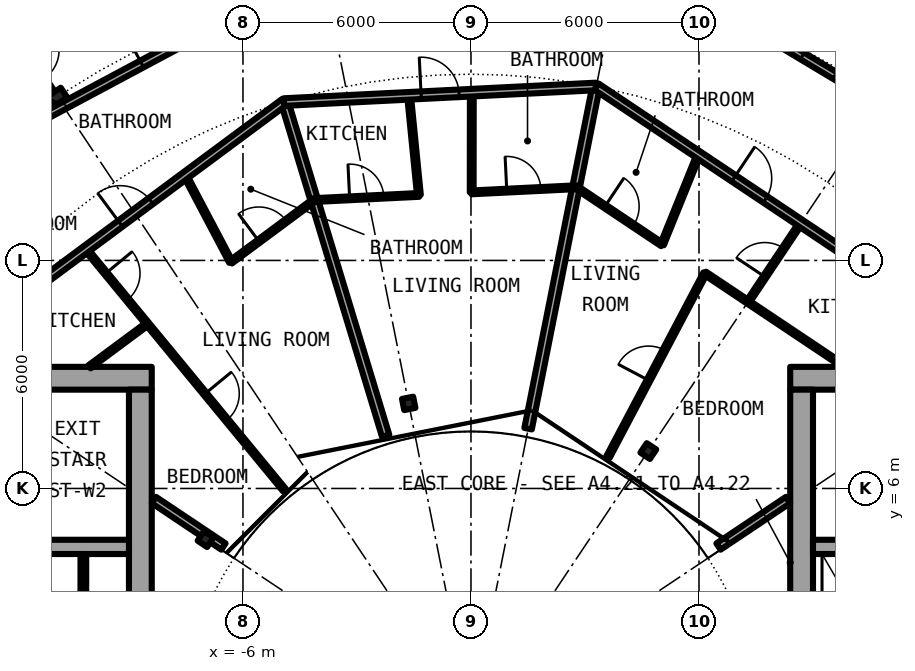
"""IFC4 building model, lengths in metres.
Left out: names, types, materials, properties, quantities, classifications, styles, units other than length and angle.
Written with IfcOpenShell. Run it as: python <this file> out.ifc"""

import sys

from ifc_helpers import new_model, si_unit, direction, frame, frame_2d, origin, origin_2d, place, context, subcontext, project, spatial, rectangle, i_section, extrude, element, fill, save


model = new_model("IFC4")
c1 = context("Model", 3, precision=1e-05, world=origin(), true_north=direction((0.0, 1.0)))
c2 = subcontext(c1, "Body", "Model", "MODEL_VIEW")
j1 = project(units=[si_unit("LENGTHUNIT", "METRE"), si_unit("PLANEANGLEUNIT", "RADIAN")], contexts=[c1])
p1 = place(None, origin())
s1 = spatial("IfcSite", under=j1, at=p1, CompositionType="ELEMENT")
p2 = place(p1, origin())
s2 = spatial("IfcBuilding", under=s1, at=p2, CompositionType="ELEMENT")
p3 = place(p2, frame((0.0, 0.0, 123.85)))
s3 = spatial("IfcBuildingStorey", under=s2, at=p3, CompositionType="ELEMENT", Elevation=123.85)
p4 = place(p3, frame((-10.889, 16.297, 0.0), z_axis=(0.0, 0.0, 1.0), x_axis=(-0.55557023302, 0.831469612303, 0.0)))
e1 = element("IfcColumn", 1, at=p4, inside=s3, PredefinedType="COLUMN", context=c2, shape_type="SweptSolid", body=[
    extrude(i_section(OverallWidth=0.307, OverallDepth=0.432, WebThickness=0.021, FlangeThickness=0.04, FilletRadius=0.027, at=origin_2d()), origin(), (0.0, 0.0, 1.0), 3.05),
])
for number, where, z_axis, x_axis in (
    (2, (4.667, 6.984, 0.0), (0.0, 0.0, 1.0), (0.556, 0.831, 0.0)),
    (3, (-1.639, 8.239, 0.0), (0.0, 0.0, 1.0), (-0.195, 0.981, 0.0)),
    (4, (-6.984, 4.667, 0.0), (0.0, 0.0, 1.0), (-0.831, 0.556, 0.0)),
):
    element("IfcColumn", number, at=place(p3, frame(where, z_axis=z_axis, x_axis=x_axis)), inside=s3, PredefinedType="COLUMN", context=c2, shape_type="SweptSolid", body=[
        extrude(i_section(OverallWidth=0.3, OverallDepth=0.3, WebThickness=0.011, FlangeThickness=0.019, FilletRadius=0.027, at=origin_2d()), origin(), (0.0, 0.0, 1.0), 3.05),
    ])
p5 = place(p3, frame((22.2, 8.9, 0.0), z_axis=(0.0, 0.0, 1.0), x_axis=(-1.0, 0.0, 0.0)))
e5 = element("IfcWall", 5, at=p5, inside=s3, PredefinedType="SHEAR", context=c2, shape_type="SweptSolid", body=[
    extrude(rectangle(XDim=13.8, YDim=0.6, at=frame_2d((6.9, 0.0))), origin(), (0.0, 0.0, 1.0), 3.05),
])
p6 = place(p5, frame((1.125, 0.0, 0.0)))
e6 = element("IfcOpeningElement", 6, at=p6, cuts=e5, PredefinedType="OPENING", context=c2, shape_type="SweptSolid", body=[
    extrude(rectangle(XDim=1.2, YDim=2.3, at=frame_2d((0.6, 1.15))), frame((0.0, 0.31, 0.0), z_axis=(0.0, -1.0, 0.0), x_axis=(1.0, 0.0, 0.0)), (0.0, 0.0, 1.0), 0.62),
])
p7 = place(p3, frame((8.7, -8.6, 0.0), z_axis=(0.0, 0.0, 1.0), x_axis=(0.0, 1.0, 0.0)))
e7 = element("IfcWall", 7, at=p7, inside=s3, PredefinedType="SHEAR", context=c2, shape_type="SweptSolid", body=[
    extrude(rectangle(XDim=17.2, YDim=0.6, at=frame_2d((8.6, 0.0))), origin(), (0.0, 0.0, 1.0), 3.05),
])
p8 = place(p7, frame((7.4, 0.0, 0.1)))
e8 = element("IfcOpeningElement", 8, at=p8, cuts=e7, PredefinedType="OPENING", context=c2, shape_type="SweptSolid", body=[
    extrude(rectangle(XDim=2.4, YDim=2.2, at=frame_2d((1.2, 1.1))), frame((0.0, 0.31, 0.0), z_axis=(0.0, -1.0, 0.0), x_axis=(1.0, 0.0, 0.0)), (0.0, 0.0, 1.0), 0.62),
])
p9 = place(p3, frame((9.0, 4.462, 0.0), z_axis=(0.0, 0.0, 1.0), x_axis=(1.0, 0.0, 0.0)))
e9 = element("IfcWall", 9, at=p9, inside=s3, PredefinedType="SHEAR", context=c2, shape_type="SweptSolid", body=[
    extrude(rectangle(XDim=10.15, YDim=0.375, at=frame_2d((5.075, 0.0))), origin(), (0.0, 0.0, 1.0), 3.05),
])
p10 = place(p9, frame((6.6, 0.0, 0.0)))
e10 = element("IfcOpeningElement", 10, at=p10, cuts=e9, PredefinedType="OPENING", context=c2, shape_type="SweptSolid", body=[
    extrude(rectangle(XDim=1.1, YDim=2.3, at=frame_2d((0.55, 1.15))), frame((0.0, 0.198, 0.0), z_axis=(0.0, -1.0, 0.0), x_axis=(1.0, 0.0, 0.0)), (0.0, 0.0, 1.0), 0.395),
])
p11 = place(p3, frame((-8.4, 8.9, 0.0), z_axis=(0.0, 0.0, 1.0), x_axis=(-1.0, 0.0, 0.0)))
e11 = element("IfcWall", 11, at=p11, inside=s3, PredefinedType="SHEAR", context=c2, shape_type="SweptSolid", body=[
    extrude(rectangle(XDim=13.8, YDim=0.6, at=frame_2d((6.9, 0.0))), origin(), (0.0, 0.0, 1.0), 3.05),
])
p12 = place(p11, frame((11.475, 0.0, 0.0)))
e12 = element("IfcOpeningElement", 12, at=p12, cuts=e11, PredefinedType="OPENING", context=c2, shape_type="SweptSolid", body=[
    extrude(rectangle(XDim=1.2, YDim=2.3, at=frame_2d((0.6, 1.15))), frame((0.0, 0.31, 0.0), z_axis=(0.0, -1.0, 0.0), x_axis=(1.0, 0.0, 0.0)), (0.0, 0.0, 1.0), 0.62),
])
p13 = place(p3, frame((-8.7, 8.6, 0.0), z_axis=(0.0, 0.0, 1.0), x_axis=(0.0, -1.0, 0.0)))
e13 = element("IfcWall", 13, at=p13, inside=s3, PredefinedType="SHEAR", context=c2, shape_type="SweptSolid", body=[
    extrude(rectangle(XDim=17.2, YDim=0.6, at=frame_2d((8.6, 0.0))), origin(), (0.0, 0.0, 1.0), 3.05),
])
p14 = place(p13, frame((7.4, 0.0, 0.1)))
e14 = element("IfcOpeningElement", 14, at=p14, cuts=e13, PredefinedType="OPENING", context=c2, shape_type="SweptSolid", body=[
    extrude(rectangle(XDim=2.4, YDim=2.2, at=frame_2d((1.2, 1.1))), frame((0.0, 0.31, 0.0), z_axis=(0.0, -1.0, 0.0), x_axis=(1.0, 0.0, 0.0)), (0.0, 0.0, 1.0), 0.62),
])
p15 = place(p3, frame((-9.0, 4.462, 0.0), z_axis=(0.0, 0.0, 1.0), x_axis=(-1.0, 0.0, 0.0)))
e15 = element("IfcWall", 15, at=p15, inside=s3, PredefinedType="SHEAR", context=c2, shape_type="SweptSolid", body=[
    extrude(rectangle(XDim=10.15, YDim=0.375, at=frame_2d((5.075, 0.0))), origin(), (0.0, 0.0, 1.0), 3.05),
])
p16 = place(p3, frame((-10.2, 1.825, 0.0), z_axis=(0.0, 0.0, 1.0), x_axis=(0.0, 1.0, 0.0)))
e16 = element("IfcWall", 16, at=p16, inside=s3, PredefinedType="PARTITIONING", context=c2, shape_type="SweptSolid", body=[
    extrude(rectangle(XDim=2.45, YDim=0.15, at=frame_2d((1.225, 0.0))), origin(), (0.0, 0.0, 1.0), 2.7),
])
p17 = place(p3, frame((-4.907, 16.172, 0.0), z_axis=(0.0, 0.0, 1.0), x_axis=(0.289977130626, -0.957033575019, 0.0)))
e17 = element("IfcWall", 17, at=p17, inside=s3, PredefinedType="PARTITIONING", context=c2, shape_type="SweptSolid", body=[
    extrude(rectangle(XDim=9.18, YDim=0.2, at=frame_2d((4.59, 0.0))), origin(), (0.0, 0.0, 1.0), 2.7),
])
p18 = place(p3, frame((-12.229, 18.264, 0.0), z_axis=(0.0, 0.0, 1.0), x_axis=(0.556469477731, -0.830868052313, 0.0)))
e18 = element("IfcWall", 18, at=p18, inside=s3, PredefinedType="PARTITIONING", context=c2, shape_type="SweptSolid", body=[
    extrude(rectangle(XDim=2.164, YDim=0.1, at=frame_2d((1.082, 0.0))), origin(), (0.0, 0.0, 1.0), 2.7),
])
p19 = place(p18, frame((0.881, 0.0, 0.0)))
e19 = element("IfcOpeningElement", 19, at=p19, cuts=e18, PredefinedType="OPENING", context=c2, shape_type="SweptSolid", body=[
    extrude(rectangle(XDim=0.9, YDim=2.3, at=frame_2d((0.45, 1.15))), frame((0.0, 0.06, 0.0), z_axis=(0.0, -1.0, 0.0), x_axis=(1.0, 0.0, 0.0)), (0.0, 0.0, 1.0), 0.12),
])
p20 = place(p3, frame((-10.132, 12.296, 0.0), z_axis=(0.0, 0.0, 1.0), x_axis=(0.635976043025, -0.771708800454, 0.0)))
e20 = element("IfcWall", 20, at=p20, inside=s3, PredefinedType="PARTITIONING", context=c2, shape_type="SweptSolid", body=[
    extrude(rectangle(XDim=8.213, YDim=0.1, at=frame_2d((4.106, 0.0))), origin(), (0.0, 0.0, 1.0), 2.7),
])
p21 = place(p20, frame((0.823, 0.0, 0.0)))
e21 = element("IfcOpeningElement", 21, at=p21, cuts=e20, PredefinedType="OPENING", context=c2, shape_type="SweptSolid", body=[
    extrude(rectangle(XDim=0.9, YDim=2.3, at=frame_2d((0.45, 1.15))), frame((0.0, 0.06, 0.0), z_axis=(0.0, -1.0, 0.0), x_axis=(1.0, 0.0, 0.0)), (0.0, 0.0, 1.0), 0.12),
])
p22 = place(p20, frame((4.929, 0.0, 0.0)))
e22 = element("IfcOpeningElement", 22, at=p22, cuts=e20, PredefinedType="OPENING", context=c2, shape_type="SweptSolid", body=[
    extrude(rectangle(XDim=0.9, YDim=2.3, at=frame_2d((0.45, 1.15))), frame((0.0, 0.06, 0.0), z_axis=(0.0, -1.0, 0.0), x_axis=(1.0, 0.0, 0.0)), (0.0, 0.0, 1.0), 0.12),
])
p23 = place(p3, frame((-7.519, 14.234, 0.0), z_axis=(0.0, 0.0, 1.0), x_axis=(0.467001992543, -0.884256263173, 0.0)))
e23 = element("IfcWall", 23, at=p23, inside=s3, PredefinedType="PARTITIONING", context=c2, shape_type="SweptSolid", body=[
    extrude(rectangle(XDim=2.572, YDim=0.1, at=frame_2d((1.286, 0.0))), origin(), (0.0, 0.0, 1.0), 2.7),
])
for number, where, z_axis, x_axis in (
    (24, (-1.63, 16.332, 0.0), (0.0, 0.0, 1.0), (0.099, -0.995, 0.0)),
    (25, (0.019, 13.792, 0.0), (0.0, 0.0, 1.0), (0.001, 1.0, 0.0)),
):
    element("IfcWall", number, at=place(p3, frame(where, z_axis=z_axis, x_axis=x_axis)), inside=s3, PredefinedType="PARTITIONING", context=c2, shape_type="SweptSolid", body=[
        extrude(rectangle(XDim=2.622, YDim=0.1, at=frame_2d((1.311, 0.0))), origin(), (0.0, 0.0, 1.0), 2.7),
    ])
p24 = place(p3, frame((1.503, 7.573, 0.0), z_axis=(0.0, 0.0, 1.0), x_axis=(0.194908854522, 0.980821359081, 0.0)))
e26 = element("IfcWall", 26, at=p24, inside=s3, PredefinedType="PARTITIONING", context=c2, shape_type="SweptSolid", body=[
    extrude(rectangle(XDim=9.179, YDim=0.2, at=frame_2d((4.589, 0.0))), origin(), (0.0, 0.0, 1.0), 2.7),
])
p25 = place(p3, frame((3.606, 6.827, 0.0), z_axis=(0.0, 0.0, 1.0), x_axis=(0.466976820365, 0.884269556889, 0.0)))
e27 = element("IfcWall", 27, at=p25, inside=s3, PredefinedType="PARTITIONING", context=c2, shape_type="SweptSolid", body=[
    extrude(rectangle(XDim=5.469, YDim=0.1, at=frame_2d((2.735, 0.0))), origin(), (0.0, 0.0, 1.0), 2.7),
])
p26 = place(p25, frame((2.284, 0.0, 0.0)))
e28 = element("IfcOpeningElement", 28, at=p26, cuts=e27, PredefinedType="OPENING", context=c2, shape_type="SweptSolid", body=[
    extrude(rectangle(XDim=0.9, YDim=2.3, at=frame_2d((0.45, 1.15))), frame((0.0, 0.06, 0.0), z_axis=(0.0, -1.0, 0.0), x_axis=(1.0, 0.0, 0.0)), (0.0, 0.0, 1.0), 0.12),
])
p27 = place(p3, frame((5.029, 12.418, 0.0), z_axis=(0.0, 0.0, 1.0), x_axis=(0.375649498413, 0.926761811008, 0.0)))
e29 = element("IfcWall", 29, at=p27, inside=s3, PredefinedType="PARTITIONING", context=c2, shape_type="SweptSolid", body=[
    extrude(rectangle(XDim=2.548, YDim=0.1, at=frame_2d((1.274, 0.0))), origin(), (0.0, 0.0, 1.0), 2.7),
])
p28 = place(p3, frame((7.289, 10.908, 0.0), z_axis=(0.0, 0.0, 1.0), x_axis=(0.555355163998, 0.831613276602, 0.0)))
e30 = element("IfcWall", 30, at=p28, inside=s3, PredefinedType="PARTITIONING", context=c2, shape_type="SweptSolid", body=[
    extrude(rectangle(XDim=2.494, YDim=0.1, at=frame_2d((1.247, 0.0))), origin(), (0.0, 0.0, 1.0), 2.7),
])
p29 = place(p28, frame((0.797, 0.0, 0.0)))
e31 = element("IfcOpeningElement", 31, at=p29, cuts=e30, PredefinedType="OPENING", context=c2, shape_type="SweptSolid", body=[
    extrude(rectangle(XDim=0.9, YDim=2.3, at=frame_2d((0.45, 1.15))), frame((0.0, 0.06, 0.0), z_axis=(0.0, -1.0, 0.0), x_axis=(1.0, 0.0, 0.0)), (0.0, 0.0, 1.0), 0.12),
])
for number, where, z_axis, x_axis in (
    (32, (-6.513, 4.472, 0.0), (0.0, 0.0, 1.0), (-0.831, 0.556, 0.0)),
    (33, (6.513, 4.472, 0.0), (0.0, 0.0, 1.0), (0.831, 0.556, 0.0)),
):
    element("IfcWall", number, at=place(p3, frame(where, z_axis=z_axis, x_axis=x_axis)), inside=s3, PredefinedType="PARTITIONING", context=c2, shape_type="SweptSolid", body=[
        extrude(rectangle(XDim=2.203, YDim=0.2, at=frame_2d((1.101, 0.0))), origin(), (0.0, 0.0, 1.0), 2.7),
    ])
p30 = place(p3, frame((2.771, 13.926, 0.0), z_axis=(0.0, 0.0, 1.0), x_axis=(0.831538390496, -0.555467285384, 0.0)))
e34 = element("IfcWall", 34, at=p30, inside=s3, PredefinedType="PARTITIONING", context=c2, shape_type="SweptSolid", body=[
    extrude(rectangle(XDim=2.717, YDim=0.1, at=frame_2d((1.358, 0.0))), origin(), (0.0, 0.0, 1.0), 2.7),
])
p31 = place(p30, frame((0.907, 0.0, 0.0)))
e35 = element("IfcOpeningElement", 35, at=p31, cuts=e34, PredefinedType="OPENING", context=c2, shape_type="SweptSolid", body=[
    extrude(rectangle(XDim=0.9, YDim=2.3, at=frame_2d((0.45, 1.15))), frame((0.0, 0.06, 0.0), z_axis=(0.0, -1.0, 0.0), x_axis=(1.0, 0.0, 0.0)), (0.0, 0.0, 1.0), 0.12),
])
p32 = place(p3, frame((6.159, 11.663, 0.0), z_axis=(0.0, 0.0, 1.0), x_axis=(0.831448270228, -0.555602172363, 0.0)))
e36 = element("IfcWall", 36, at=p32, inside=s3, PredefinedType="PARTITIONING", context=c2, shape_type="SweptSolid", body=[
    extrude(rectangle(XDim=4.433, YDim=0.1, at=frame_2d((2.217, 0.0))), origin(), (0.0, 0.0, 1.0), 2.7),
])
p33 = place(p3, frame((-10.039, 9.2, 0.0), z_axis=(0.0, 0.0, 1.0), x_axis=(0.803149591038, 0.595777420196, 0.0)))
e37 = element("IfcWall", 37, at=p33, inside=s3, PredefinedType="PARTITIONING", context=c2, shape_type="SweptSolid", body=[
    extrude(rectangle(XDim=1.9, YDim=0.1, at=frame_2d((0.95, 0.0))), origin(), (0.0, 0.0, 1.0), 2.7),
])
p34 = place(p3, frame((-6.318, 11.96, 0.0), z_axis=(0.0, 0.0, 1.0), x_axis=(0.803128348509, 0.595806055542, 0.0)))
e38 = element("IfcWall", 38, at=p34, inside=s3, PredefinedType="PARTITIONING", context=c2, shape_type="SweptSolid", body=[
    extrude(rectangle(XDim=2.734, YDim=0.1, at=frame_2d((1.367, 0.0))), origin(), (0.0, 0.0, 1.0), 2.7),
])
p35 = place(p34, frame((0.917, 0.0, 0.0)))
e39 = element("IfcOpeningElement", 39, at=p35, cuts=e38, PredefinedType="OPENING", context=c2, shape_type="SweptSolid", body=[
    extrude(rectangle(XDim=0.9, YDim=2.3, at=frame_2d((0.45, 1.15))), frame((0.0, 0.06, 0.0), z_axis=(0.0, -1.0, 0.0), x_axis=(1.0, 0.0, 0.0)), (0.0, 0.0, 1.0), 0.12),
])
p36 = place(p3, frame((-4.122, 13.589, 0.0), z_axis=(0.0, 0.0, 1.0), x_axis=(0.99880320044, 0.048909782152, 0.0)))
e40 = element("IfcWall", 40, at=p36, inside=s3, PredefinedType="PARTITIONING", context=c2, shape_type="SweptSolid", body=[
    extrude(rectangle(XDim=2.76, YDim=0.1, at=frame_2d((1.38, 0.0))), origin(), (0.0, 0.0, 1.0), 2.7),
])
p37 = place(p36, frame((0.93, 0.0, 0.0)))
e41 = element("IfcOpeningElement", 41, at=p37, cuts=e40, PredefinedType="OPENING", context=c2, shape_type="SweptSolid", body=[
    extrude(rectangle(XDim=0.9, YDim=2.3, at=frame_2d((0.45, 1.15))), frame((0.0, 0.06, 0.0), z_axis=(0.0, -1.0, 0.0), x_axis=(1.0, 0.0, 0.0)), (0.0, 0.0, 1.0), 0.12),
])
p38 = place(p3, frame((0.013, 13.791, 0.0), z_axis=(0.0, 0.0, 1.0), x_axis=(0.99880320044, 0.048909782152, 0.0)))
e42 = element("IfcWall", 42, at=p38, inside=s3, PredefinedType="PARTITIONING", context=c2, shape_type="SweptSolid", body=[
    extrude(rectangle(XDim=2.76, YDim=0.1, at=frame_2d((1.38, 0.0))), origin(), (0.0, 0.0, 1.0), 2.7),
])
p39 = place(p38, frame((0.93, 0.0, 0.0)))
e43 = element("IfcOpeningElement", 43, at=p39, cuts=e42, PredefinedType="OPENING", context=c2, shape_type="SweptSolid", body=[
    extrude(rectangle(XDim=0.9, YDim=2.3, at=frame_2d((0.45, 1.15))), frame((0.0, 0.06, 0.0), z_axis=(0.0, -1.0, 0.0), x_axis=(1.0, 0.0, 0.0)), (0.0, 0.0, 1.0), 0.12),
])
p40 = place(p3, frame((3.3, 16.574, 0.0), z_axis=(0.0, 0.0, 1.0), x_axis=(0.831455567902, -0.555591251376, 0.0)))
e44 = element("IfcWall", 44, at=p40, inside=s3, PredefinedType="PARTITIONING", context=c2, shape_type="SweptSolid", body=[
    extrude(rectangle(XDim=11.314, YDim=0.2, at=frame_2d((5.657, 0.0))), origin(), (0.0, 0.0, 1.0), 2.7),
])
p41 = place(p40, frame((4.346, 0.0, 0.0)))
e45 = element("IfcOpeningElement", 45, at=p41, cuts=e44, PredefinedType="OPENING", context=c2, shape_type="SweptSolid", body=[
    extrude(rectangle(XDim=1.0, YDim=2.3, at=frame_2d((0.5, 1.15))), frame((0.0, 0.11, 0.0), z_axis=(0.0, -1.0, 0.0), x_axis=(1.0, 0.0, 0.0)), (0.0, 0.0, 1.0), 0.22),
])
p42 = place(p3, frame((-12.745, 10.358, 0.0), z_axis=(0.0, 0.0, 1.0), x_axis=(0.803191461888, 0.595720971219, 0.0)))
e46 = element("IfcWall", 46, at=p42, inside=s3, PredefinedType="PARTITIONING", context=c2, shape_type="SweptSolid", body=[
    extrude(rectangle(XDim=9.76, YDim=0.2, at=frame_2d((4.88, 0.0))), origin(), (0.0, 0.0, 1.0), 2.7),
])
p43 = place(p42, frame((4.38, 0.0, 0.0)))
e47 = element("IfcOpeningElement", 47, at=p43, cuts=e46, PredefinedType="OPENING", context=c2, shape_type="SweptSolid", body=[
    extrude(rectangle(XDim=1.0, YDim=2.3, at=frame_2d((0.5, 1.15))), frame((0.0, 0.11, 0.0), z_axis=(0.0, -1.0, 0.0), x_axis=(1.0, 0.0, 0.0)), (0.0, 0.0, 1.0), 0.22),
])
p44 = place(p3, frame((-4.921, 16.167, 0.0), z_axis=(0.0, 0.0, 1.0), x_axis=(0.998754043059, 0.049903521659, 0.0)))
e48 = element("IfcWall", 48, at=p44, inside=s3, PredefinedType="PARTITIONING", context=c2, shape_type="SweptSolid", body=[
    extrude(rectangle(XDim=8.214, YDim=0.2, at=frame_2d((4.107, 0.0))), origin(), (0.0, 0.0, 1.0), 2.7),
])
p45 = place(p44, frame((3.614, 0.0, 0.0)))
e49 = element("IfcOpeningElement", 49, at=p45, cuts=e48, PredefinedType="OPENING", context=c2, shape_type="SweptSolid", body=[
    extrude(rectangle(XDim=1.0, YDim=2.3, at=frame_2d((0.5, 1.15))), frame((0.0, 0.11, 0.0), z_axis=(0.0, -1.0, 0.0), x_axis=(1.0, 0.0, 0.0)), (0.0, 0.0, 1.0), 0.22),
])
p46 = place(p3, frame((-12.434, 15.151, 0.0), z_axis=(0.0, 0.0, 1.0), x_axis=(0.8819312112, 0.471378127104, 0.0)))
e50 = element("IfcWall", 50, at=p46, inside=s3, PredefinedType="PARTITIONING", context=c2, shape_type="SweptSolid", body=[
    extrude(rectangle(XDim=7.65, YDim=0.2, at=frame_2d((3.825, 0.0))), origin(), (0.0, 0.0, 1.0), 2.39),
])
p47 = place(p46, frame((4.279, 0.0, 0.0)))
e51 = element("IfcOpeningElement", 51, at=p47, cuts=e50, PredefinedType="OPENING", context=c2, shape_type="SweptSolid", body=[
    extrude(rectangle(XDim=1.0, YDim=2.3, at=frame_2d((0.5, 1.15))), frame((0.0, 0.11, 0.0), z_axis=(0.0, -1.0, 0.0), x_axis=(1.0, 0.0, 0.0)), (0.0, 0.0, 1.0), 0.22),
])
p48 = place(p3, frame((7.501, 18.108, 0.0), z_axis=(0.0, 0.0, 1.0), x_axis=(0.857774179698, -0.514026708103, 0.0)))
e52 = element("IfcWall", 52, at=p48, inside=s3, PredefinedType="PARTITIONING", context=c2, shape_type="SweptSolid", body=[
    extrude(rectangle(XDim=3.675, YDim=0.2, at=frame_2d((1.837, 0.0))), origin(), (0.0, 0.0, 1.0), 2.39),
])
p49 = place(p48, frame((1.418, 0.0, 0.0)))
e53 = element("IfcOpeningElement", 53, at=p49, cuts=e52, PredefinedType="OPENING", context=c2, shape_type="SweptSolid", body=[
    extrude(rectangle(XDim=1.0, YDim=2.3, at=frame_2d((0.5, 1.15))), frame((0.0, 0.11, 0.0), z_axis=(0.0, -1.0, 0.0), x_axis=(1.0, 0.0, 0.0)), (0.0, 0.0, 1.0), 0.22),
])
p50 = place(p49, origin())
e54 = element("IfcDoor", 54, at=p50, inside=s3, OperationType="SINGLE_SWING_RIGHT", PredefinedType="DOOR", context=c2, shape_type="SweptSolid", body=[
    extrude(rectangle(XDim=1.0, YDim=2.3, at=frame_2d((0.5, 1.15))), frame((0.0, 0.025, 0.0), z_axis=(0.0, -1.0, 0.0), x_axis=(1.0, 0.0, 0.0)), (0.0, 0.0, 1.0), 0.05),
])
fill(e53, e54)
p51 = place(p47, origin())
e55 = element("IfcDoor", 55, at=p51, inside=s3, OperationType="SINGLE_SWING_RIGHT", PredefinedType="DOOR", context=c2, shape_type="SweptSolid", body=[
    extrude(rectangle(XDim=1.0, YDim=2.3, at=frame_2d((0.5, 1.15))), frame((0.0, 0.025, 0.0), z_axis=(0.0, -1.0, 0.0), x_axis=(1.0, 0.0, 0.0)), (0.0, 0.0, 1.0), 0.05),
])
fill(e51, e55)
p52 = place(p41, origin())
e56 = element("IfcDoor", 56, at=p52, inside=s3, OperationType="SINGLE_SWING_LEFT", PredefinedType="DOOR", context=c2, shape_type="SweptSolid", body=[
    extrude(rectangle(XDim=1.0, YDim=2.3, at=frame_2d((0.5, 1.15))), frame((0.0, 0.025, 0.0), z_axis=(0.0, -1.0, 0.0), x_axis=(1.0, 0.0, 0.0)), (0.0, 0.0, 1.0), 0.05),
])
fill(e45, e56)
p53 = place(p31, origin())
e57 = element("IfcDoor", 57, at=p53, inside=s3, OperationType="SINGLE_SWING_LEFT", PredefinedType="DOOR", context=c2, shape_type="SweptSolid", body=[
    extrude(rectangle(XDim=0.9, YDim=2.3, at=frame_2d((0.45, 1.15))), frame((0.0, 0.025, 0.0), z_axis=(0.0, -1.0, 0.0), x_axis=(1.0, 0.0, 0.0)), (0.0, 0.0, 1.0), 0.05),
])
fill(e35, e57)
p54 = place(p29, origin())
e58 = element("IfcDoor", 58, at=p54, inside=s3, OperationType="SINGLE_SWING_RIGHT", PredefinedType="DOOR", context=c2, shape_type="SweptSolid", body=[
    extrude(rectangle(XDim=0.9, YDim=2.3, at=frame_2d((0.45, 1.15))), frame((0.0, 0.025, 0.0), z_axis=(0.0, -1.0, 0.0), x_axis=(1.0, 0.0, 0.0)), (0.0, 0.0, 1.0), 0.05),
])
fill(e31, e58)
p55 = place(p26, origin())
e59 = element("IfcDoor", 59, at=p55, inside=s3, OperationType="SINGLE_SWING_LEFT", PredefinedType="DOOR", context=c2, shape_type="SweptSolid", body=[
    extrude(rectangle(XDim=0.9, YDim=2.3, at=frame_2d((0.45, 1.15))), frame((0.0, 0.025, 0.0), z_axis=(0.0, -1.0, 0.0), x_axis=(1.0, 0.0, 0.0)), (0.0, 0.0, 1.0), 0.05),
])
fill(e28, e59)
p56 = place(p45, origin())
e60 = element("IfcDoor", 60, at=p56, inside=s3, OperationType="SINGLE_SWING_RIGHT", PredefinedType="DOOR", context=c2, shape_type="SweptSolid", body=[
    extrude(rectangle(XDim=1.0, YDim=2.3, at=frame_2d((0.5, 1.15))), frame((0.0, 0.025, 0.0), z_axis=(0.0, -1.0, 0.0), x_axis=(1.0, 0.0, 0.0)), (0.0, 0.0, 1.0), 0.05),
])
fill(e49, e60)
p57 = place(p39, origin())
e61 = element("IfcDoor", 61, at=p57, inside=s3, OperationType="SINGLE_SWING_RIGHT", PredefinedType="DOOR", context=c2, shape_type="SweptSolid", body=[
    extrude(rectangle(XDim=0.9, YDim=2.3, at=frame_2d((0.45, 1.15))), frame((0.0, 0.025, 0.0), z_axis=(0.0, -1.0, 0.0), x_axis=(1.0, 0.0, 0.0)), (0.0, 0.0, 1.0), 0.05),
])
fill(e43, e61)
p58 = place(p37, origin())
e62 = element("IfcDoor", 62, at=p58, inside=s3, OperationType="SINGLE_SWING_LEFT", PredefinedType="DOOR", context=c2, shape_type="SweptSolid", body=[
    extrude(rectangle(XDim=0.9, YDim=2.3, at=frame_2d((0.45, 1.15))), frame((0.0, 0.025, 0.0), z_axis=(0.0, -1.0, 0.0), x_axis=(1.0, 0.0, 0.0)), (0.0, 0.0, 1.0), 0.05),
])
fill(e41, e62)
p59 = place(p43, origin())
e63 = element("IfcDoor", 63, at=p59, inside=s3, OperationType="SINGLE_SWING_RIGHT", PredefinedType="DOOR", context=c2, shape_type="SweptSolid", body=[
    extrude(rectangle(XDim=1.0, YDim=2.3, at=frame_2d((0.5, 1.15))), frame((0.0, 0.025, 0.0), z_axis=(0.0, -1.0, 0.0), x_axis=(1.0, 0.0, 0.0)), (0.0, 0.0, 1.0), 0.05),
])
fill(e47, e63)
p60 = place(p35, origin())
e64 = element("IfcDoor", 64, at=p60, inside=s3, OperationType="SINGLE_SWING_RIGHT", PredefinedType="DOOR", context=c2, shape_type="SweptSolid", body=[
    extrude(rectangle(XDim=0.9, YDim=2.3, at=frame_2d((0.45, 1.15))), frame((0.0, 0.025, 0.0), z_axis=(0.0, -1.0, 0.0), x_axis=(1.0, 0.0, 0.0)), (0.0, 0.0, 1.0), 0.05),
])
fill(e39, e64)
p61 = place(p21, origin())
e65 = element("IfcDoor", 65, at=p61, inside=s3, OperationType="SINGLE_SWING_LEFT", PredefinedType="DOOR", context=c2, shape_type="SweptSolid", body=[
    extrude(rectangle(XDim=0.9, YDim=2.3, at=frame_2d((0.45, 1.15))), frame((0.0, 0.025, 0.0), z_axis=(0.0, -1.0, 0.0), x_axis=(1.0, 0.0, 0.0)), (0.0, 0.0, 1.0), 0.05),
])
fill(e21, e65)
p62 = place(p22, origin())
e66 = element("IfcDoor", 66, at=p62, inside=s3, OperationType="SINGLE_SWING_RIGHT", PredefinedType="DOOR", context=c2, shape_type="SweptSolid", body=[
    extrude(rectangle(XDim=0.9, YDim=2.3, at=frame_2d((0.45, 1.15))), frame((0.0, 0.025, 0.0), z_axis=(0.0, -1.0, 0.0), x_axis=(1.0, 0.0, 0.0)), (0.0, 0.0, 1.0), 0.05),
])
fill(e22, e66)
save(model, sys.argv[1])
